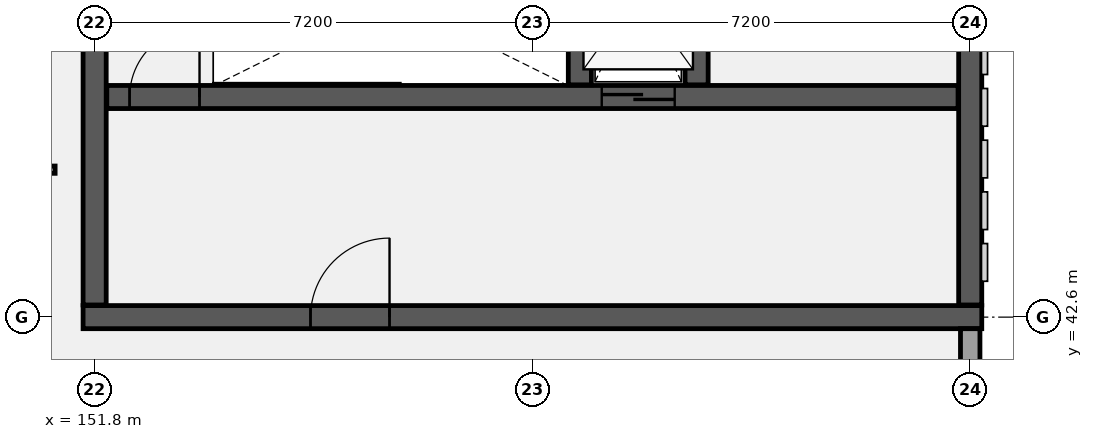
"""IFC4 building model, lengths in metres.
Left out: names, types, materials, properties, quantities, classifications, styles, units other than length and angle.
Written with IfcOpenShell. Run it as: python <this file> out.ifc"""

import sys

from ifc_helpers import new_model, si_unit, direction, frame, frame_2d, origin, place, context, subcontext, project, spatial, rectangle, extrude, element, fill, save


model = new_model("IFC4")
c1 = context("Model", 3, precision=1e-05, world=origin(), true_north=direction((0.0, 1.0)))
c2 = subcontext(c1, "Body", "Model", "MODEL_VIEW")
j1 = project(units=[si_unit("LENGTHUNIT", "METRE"), si_unit("PLANEANGLEUNIT", "RADIAN")], contexts=[c1])
p1 = place(None, origin())
s1 = spatial("IfcSite", under=j1, at=p1, CompositionType="ELEMENT")
p2 = place(p1, origin())
s2 = spatial("IfcBuilding", under=s1, at=p2, CompositionType="ELEMENT")
p3 = place(p2, frame((0.0, 0.0, 9.6)))
s3 = spatial("IfcBuildingStorey", under=s2, at=p3, CompositionType="ELEMENT", Elevation=9.6)
p4 = place(p3, frame((151.61, 42.6, 0.0), z_axis=(0.0, 0.0, 1.0), x_axis=(1.0, 0.0, 0.0)))
e1 = element("IfcWall", 1, at=p4, inside=s3, PredefinedType="SHEAR", context=c2, shape_type="SweptSolid", body=[
    extrude(rectangle(XDim=14.78, YDim=0.38, at=frame_2d((7.39, 0.0))), origin(), (0.0, 0.0, 1.0), 4.2),
])
p5 = place(p4, frame((3.74, 0.0, 0.0)))
e2 = element("IfcOpeningElement", 2, at=p5, cuts=e1, PredefinedType="OPENING", context=c2, shape_type="SweptSolid", body=[
    extrude(rectangle(XDim=1.3, YDim=2.2, at=frame_2d((0.65, 1.1))), frame((0.0, 0.2, 0.0), z_axis=(0.0, -1.0, 0.0), x_axis=(1.0, 0.0, 0.0)), (0.0, 0.0, 1.0), 0.4),
])
for number, where, z_axis, x_axis in (
    (3, (151.8, 42.8, 0.0), (0.0, 0.0, 1.0), (0.0, 1.0, 0.0)),
    (4, (166.2, 42.8, 0.0), (0.0, 0.0, 1.0), (0.0, 1.0, 0.0)),
):
    element("IfcWall", number, at=place(p3, frame(where, z_axis=z_axis, x_axis=x_axis)), inside=s3, PredefinedType="SHEAR", context=c2, shape_type="SweptSolid", body=[
        extrude(rectangle(XDim=6.8, YDim=0.38, at=frame_2d((3.4, 0.0))), origin(), (0.0, 0.0, 1.0), 4.2),
    ])
p6 = place(p3, frame((152.0, 46.22, 0.0), z_axis=(0.0, 0.0, 1.0), x_axis=(1.0, 0.0, 0.0)))
e5 = element("IfcWall", 5, at=p6, inside=s3, PredefinedType="SHEAR", context=c2, shape_type="SweptSolid", body=[
    extrude(rectangle(XDim=14.0, YDim=0.38, at=frame_2d((7.0, 0.0))), origin(), (0.0, 0.0, 1.0), 4.2),
])
p7 = place(p6, frame((8.14, 0.0, 0.0)))
e6 = element("IfcOpeningElement", 6, at=p7, cuts=e5, PredefinedType="OPENING", context=c2, shape_type="SweptSolid", body=[
    extrude(rectangle(XDim=1.2, YDim=2.15, at=frame_2d((0.6, 1.075))), frame((0.0, 0.2, 0.0), z_axis=(0.0, -1.0, 0.0), x_axis=(1.0, 0.0, 0.0)), (0.0, 0.0, 1.0), 0.4),
])
p8 = place(p6, frame((0.375, 0.0, 0.0)))
e7 = element("IfcOpeningElement", 7, at=p8, cuts=e5, PredefinedType="OPENING", context=c2, shape_type="SweptSolid", body=[
    extrude(rectangle(XDim=1.15, YDim=2.15, at=frame_2d((0.575, 1.075))), frame((0.0, 0.2, 0.0), z_axis=(0.0, -1.0, 0.0), x_axis=(1.0, 0.0, 0.0)), (0.0, 0.0, 1.0), 0.4),
])
for number, where, z_axis, x_axis in (
    (8, (159.78, 46.42, 0.0), (0.0, 0.0, 1.0), (0.0, 1.0, 0.0)),
    (9, (161.7, 46.42, 0.0), (0.0, 0.0, 1.0), (0.0, 1.0, 0.0)),
):
    element("IfcWall", number, at=place(p3, frame(where, z_axis=z_axis, x_axis=x_axis)), inside=s3, PredefinedType="SHEAR", context=c2, shape_type="SweptSolid", body=[
        extrude(rectangle(XDim=3.18, YDim=0.38, at=frame_2d((1.59, 0.0))), origin(), (0.0, 0.0, 1.0), 4.2),
    ])
p9 = place(p3, frame((166.2, 21.16, 0.0), z_axis=(0.0, 0.0, 1.0), x_axis=(0.0, 1.0, 0.0)))
e10 = element("IfcWall", 10, at=p9, inside=s3, PredefinedType="SOLIDWALL", context=c2, shape_type="SweptSolid", body=[
    extrude(rectangle(XDim=21.25, YDim=0.32, at=frame_2d((10.625, 0.0))), origin(), (0.0, 0.0, 1.0), 2.94),
])
p10 = place(p9, frame((3.02, 0.0, 1.0)))
e11 = element("IfcOpeningElement", 11, at=p10, cuts=e10, PredefinedType="OPENING", context=c2, shape_type="SweptSolid", body=[
    extrude(rectangle(XDim=1.0, YDim=1.4, at=frame_2d((0.5, 0.7))), frame((0.0, 0.17, 0.0), z_axis=(0.0, -1.0, 0.0), x_axis=(1.0, 0.0, 0.0)), (0.0, 0.0, 1.0), 0.34),
])
p11 = place(p9, frame((10.14, 0.0, 1.0)))
e12 = element("IfcOpeningElement", 12, at=p11, cuts=e10, PredefinedType="OPENING", context=c2, shape_type="SweptSolid", body=[
    extrude(rectangle(XDim=1.0, YDim=1.4, at=frame_2d((0.5, 0.7))), frame((0.0, 0.17, 0.0), z_axis=(0.0, -1.0, 0.0), x_axis=(1.0, 0.0, 0.0)), (0.0, 0.0, 1.0), 0.34),
])
p12 = place(p9, frame((17.245, 0.0, 1.0)))
e13 = element("IfcOpeningElement", 13, at=p12, cuts=e10, PredefinedType="OPENING", context=c2, shape_type="SweptSolid", body=[
    extrude(rectangle(XDim=1.0, YDim=1.4, at=frame_2d((0.5, 0.7))), frame((0.0, 0.17, 0.0), z_axis=(0.0, -1.0, 0.0), x_axis=(1.0, 0.0, 0.0)), (0.0, 0.0, 1.0), 0.34),
])
p13 = place(p3, frame((147.64, 45.025, 0.0), z_axis=(0.0, 0.0, 1.0), x_axis=(1.0, 0.0, 0.0)))
e14 = element("IfcWall", 14, at=p13, inside=s3, PredefinedType="PARTITIONING", context=c2, shape_type="SweptSolid", body=[
    extrude(rectangle(XDim=3.51, YDim=0.12, at=frame_2d((1.755, 0.0))), origin(), (0.0, 0.0, 1.0), 3.94),
])
p14 = place(p7, frame((1.2, 0.0, 0.0), z_axis=(0.0, 0.0, 1.0), x_axis=(-1.0, 0.0, 0.0)))
e15 = element("IfcDoor", 15, at=p14, inside=s3, OperationType="DOUBLE_DOOR_SLIDING", PredefinedType="DOOR", context=c2, shape_type="SweptSolid", body=[
    extrude(rectangle(XDim=1.2, YDim=2.15, at=frame_2d((0.6, 1.075))), frame((0.0, 0.025, 0.0), z_axis=(0.0, -1.0, 0.0), x_axis=(1.0, 0.0, 0.0)), (0.0, 0.0, 1.0), 0.05),
])
fill(e6, e15)
p15 = place(p8, origin())
e16 = element("IfcDoor", 16, at=p15, inside=s3, OperationType="SINGLE_SWING_RIGHT", PredefinedType="DOOR", context=c2, shape_type="SweptSolid", body=[
    extrude(rectangle(XDim=1.15, YDim=2.15, at=frame_2d((0.575, 1.075))), frame((0.0, 0.025, 0.0), z_axis=(0.0, -1.0, 0.0), x_axis=(1.0, 0.0, 0.0)), (0.0, 0.0, 1.0), 0.05),
])
fill(e7, e16)
p16 = place(p5, frame((1.3, 0.0, 0.0), z_axis=(0.0, 0.0, 1.0), x_axis=(-1.0, 0.0, 0.0)))
e17 = element("IfcDoor", 17, at=p16, inside=s3, OperationType="SINGLE_SWING_RIGHT", PredefinedType="DOOR", context=c2, shape_type="SweptSolid", body=[
    extrude(rectangle(XDim=1.3, YDim=2.2, at=frame_2d((0.65, 1.1))), frame((0.0, 0.025, 0.0), z_axis=(0.0, -1.0, 0.0), x_axis=(1.0, 0.0, 0.0)), (0.0, 0.0, 1.0), 0.05),
])
fill(e2, e17)
save(model, sys.argv[1])
